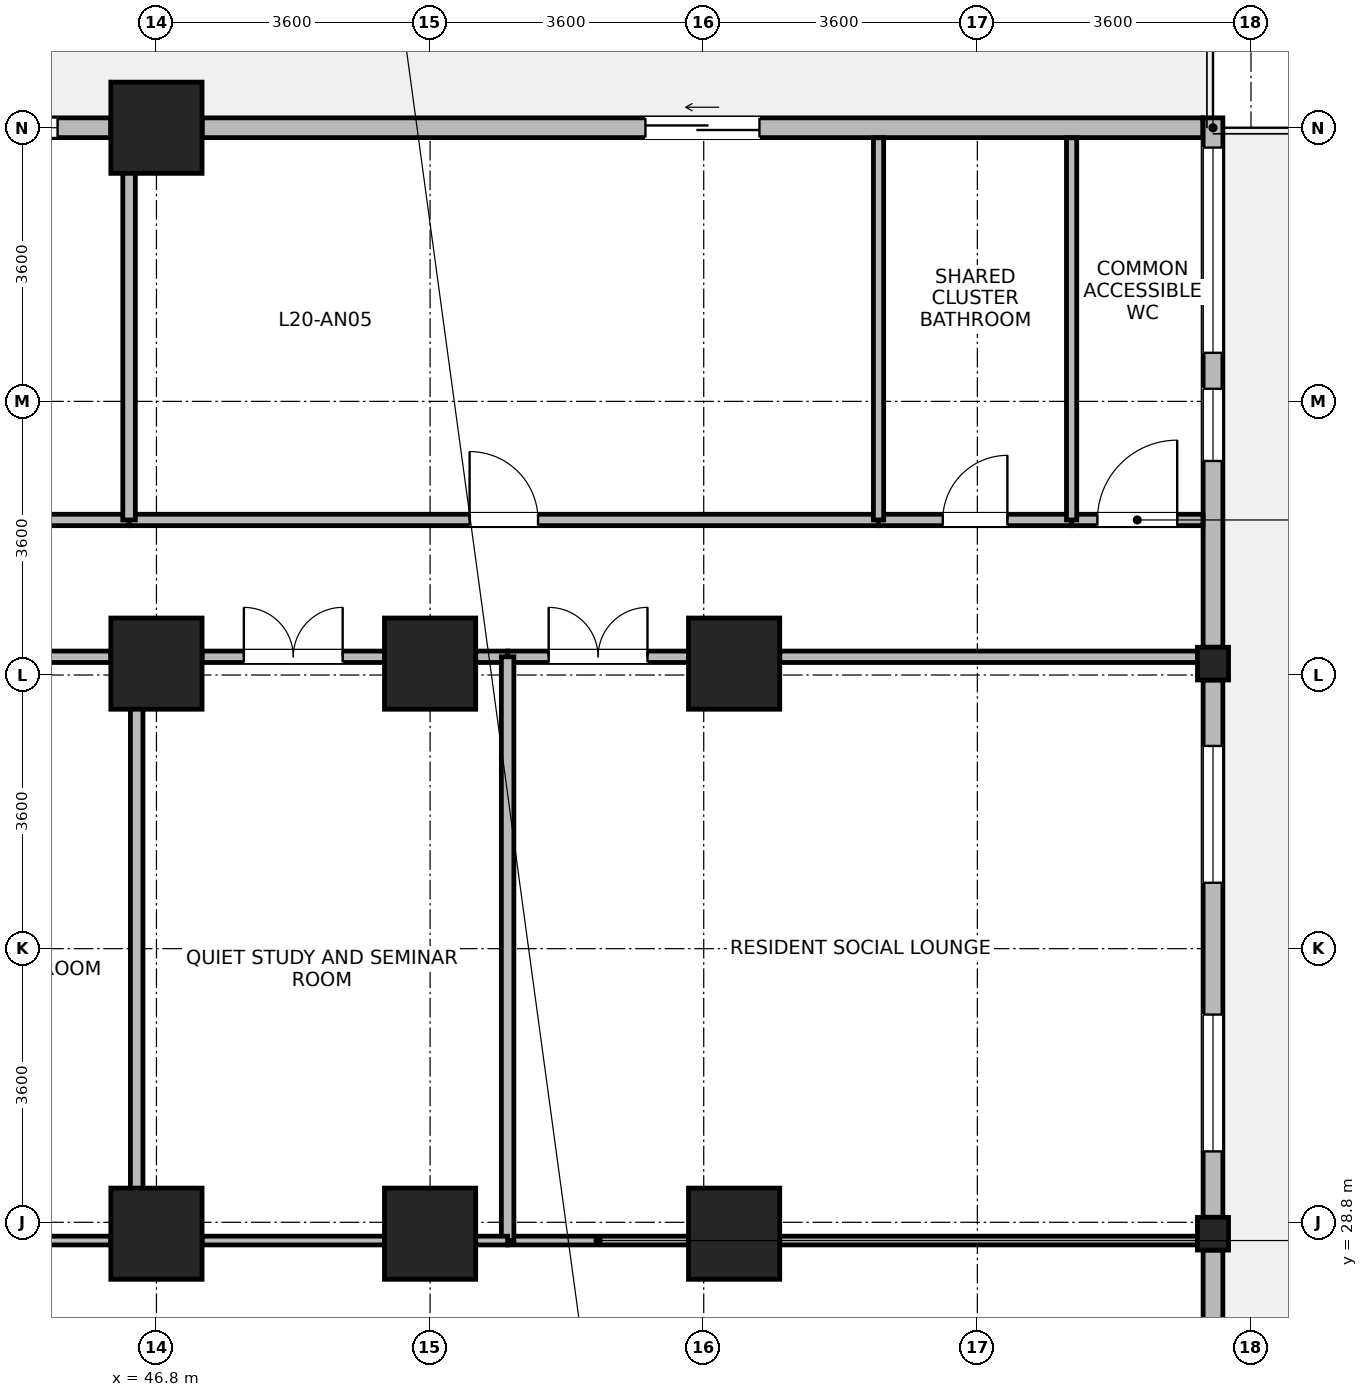
"""IFC4 building model, lengths in metres.
Left out: names, types, materials, properties, quantities, classifications, styles, units other than length and angle.
Written with IfcOpenShell. Run it as: python <this file> out.ifc"""

import sys

from ifc_helpers import new_model, si_unit, direction, frame, frame_2d, origin, origin_2d, place, context, subcontext, project, spatial, rectangle, i_section, extrude, source, transform, mapped, element, fill, save


model = new_model("IFC4")
c1 = context("Model", 3, precision=1e-05, world=origin(), true_north=direction((0.0, 1.0)))
c2 = subcontext(c1, "Body", "Model", "MODEL_VIEW")
j1 = project(units=[si_unit("LENGTHUNIT", "METRE"), si_unit("PLANEANGLEUNIT", "RADIAN")], contexts=[c1])
p1 = place(None, origin())
s1 = spatial("IfcSite", under=j1, at=p1, CompositionType="ELEMENT")
p2 = place(p1, origin())
s2 = spatial("IfcBuilding", under=s1, at=p2, CompositionType="ELEMENT")
p3 = place(p2, frame((0.0, 0.0, 82.3)))
s3 = spatial("IfcBuildingStorey", under=s2, at=p3, CompositionType="ELEMENT", Elevation=82.3)
m1 = source(origin(), c2, "Body", "SweptSolid", [
    extrude(rectangle(XDim=1.2, YDim=1.2, at=origin_2d()), origin(), (0.0, 0.0, 1.0), 3.7),
])
for number, where, z_axis, x_axis in (
    (1, (46.8, 28.65, 0.0), (0.0, 0.0, 1.0), (1.0, 0.0, 0.0)),
    (2, (46.8, 36.15, 0.0), (0.0, 0.0, 1.0), (1.0, 0.0, 0.0)),
    (3, (46.8, 43.2, 0.0), (0.0, 0.0, 1.0), (1.0, 0.0, 0.0)),
    (4, (50.4, 28.65, 0.0), (0.0, 0.0, 1.0), (1.0, 0.0, 0.0)),
    (5, (50.4, 36.15, 0.0), (0.0, 0.0, 1.0), (1.0, 0.0, 0.0)),
    (6, (54.4, 28.65, 0.0), (0.0, 0.0, 1.0), (1.0, 0.0, 0.0)),
    (7, (54.4, 36.15, 0.0), (0.0, 0.0, 1.0), (1.0, 0.0, 0.0)),
):
    element("IfcColumn", number, at=place(p3, frame(where, z_axis=z_axis, x_axis=x_axis)), inside=s3, PredefinedType="COLUMN", context=c2, shape_type="MappedRepresentation", body=[
        mapped(m1, transform((0.0, 0.0, 0.0), x_axis=(1.0, 0.0, 0.0), y_axis=(0.0, 1.0, 0.0), z_axis=(0.0, 0.0, 1.0), scale=1.0)),
    ])
m2 = source(origin(), c2, "Body", "SweptSolid", [
    extrude(i_section(OverallWidth=0.409, OverallDepth=0.43, WebThickness=0.024, FlangeThickness=0.033, FilletRadius=0.015, at=origin_2d()), origin(), (0.0, 0.0, 1.0), 3.7),
])
for number, where, z_axis, x_axis in (
    (8, (60.7, 28.65, 0.0), (0.0, 0.0, 1.0), (1.0, 0.0, 0.0)),
    (9, (60.7, 36.15, 0.0), (0.0, 0.0, 1.0), (1.0, 0.0, 0.0)),
):
    element("IfcColumn", number, at=place(p3, frame(where, z_axis=z_axis, x_axis=x_axis)), inside=s3, PredefinedType="COLUMN", context=c2, shape_type="MappedRepresentation", body=[
        mapped(m2, transform((0.0, 0.0, 0.0), x_axis=(1.0, 0.0, 0.0), y_axis=(0.0, 1.0, 0.0), z_axis=(0.0, 0.0, 1.0), scale=1.0)),
    ])
p4 = place(p3, frame((60.7, 28.434, 0.0), z_axis=(0.0, 0.0, 1.0), x_axis=(0.0, -1.0, 0.0)))
e10 = element("IfcWall", 10, at=p4, inside=s3, PredefinedType="STANDARD", context=c2, shape_type="SweptSolid", body=[
    extrude(rectangle(XDim=6.618, YDim=0.26, at=frame_2d((3.309, 0.0))), origin(), (0.0, 0.0, 1.0), 2.93),
])
p5 = place(p4, frame((4.063, 0.0, 0.85)))
e11 = element("IfcOpeningElement", 11, at=p5, cuts=e10, PredefinedType="OPENING", context=c2, shape_type="SweptSolid", body=[
    extrude(rectangle(XDim=1.8, YDim=1.85, at=frame_2d((0.9, 0.925))), frame((0.0, 0.14, 0.0), z_axis=(0.0, -1.0, 0.0), x_axis=(1.0, 0.0, 0.0)), (0.0, 0.0, 1.0), 0.28),
])
p6 = place(p4, frame((2.305, 0.0, 0.85)))
e12 = element("IfcOpeningElement", 12, at=p6, cuts=e10, PredefinedType="OPENING", context=c2, shape_type="SweptSolid", body=[
    extrude(rectangle(XDim=0.95, YDim=1.75, at=frame_2d((0.475, 0.875))), frame((0.0, 0.14, 0.0), z_axis=(0.0, -1.0, 0.0), x_axis=(1.0, 0.0, 0.0)), (0.0, 0.0, 1.0), 0.28),
])
p7 = place(p3, frame((60.7, 35.934, 0.0), z_axis=(0.0, 0.0, 1.0), x_axis=(0.0, -1.0, 0.0)))
e13 = element("IfcWall", 13, at=p7, inside=s3, PredefinedType="STANDARD", context=c2, shape_type="SweptSolid", body=[
    extrude(rectangle(XDim=7.068, YDim=0.26, at=frame_2d((3.534, 0.0))), origin(), (0.0, 0.0, 1.0), 2.93),
])
p8 = place(p7, frame((0.867, 0.0, 0.85)))
e14 = element("IfcOpeningElement", 14, at=p8, cuts=e13, PredefinedType="OPENING", context=c2, shape_type="SweptSolid", body=[
    extrude(rectangle(XDim=1.8, YDim=1.85, at=frame_2d((0.9, 0.925))), frame((0.0, 0.14, 0.0), z_axis=(0.0, -1.0, 0.0), x_axis=(1.0, 0.0, 0.0)), (0.0, 0.0, 1.0), 0.28),
])
p9 = place(p7, frame((4.401, 0.0, 0.85)))
e15 = element("IfcOpeningElement", 15, at=p9, cuts=e13, PredefinedType="OPENING", context=c2, shape_type="SweptSolid", body=[
    extrude(rectangle(XDim=1.8, YDim=1.85, at=frame_2d((0.9, 0.925))), frame((0.0, 0.14, 0.0), z_axis=(0.0, -1.0, 0.0), x_axis=(1.0, 0.0, 0.0)), (0.0, 0.0, 1.0), 0.28),
])
p10 = place(p3, frame((60.7, 43.33, 0.0), z_axis=(0.0, 0.0, 1.0), x_axis=(0.0, -1.0, 0.0)))
e16 = element("IfcWall", 16, at=p10, inside=s3, PredefinedType="STANDARD", context=c2, shape_type="SweptSolid", body=[
    extrude(rectangle(XDim=6.964, YDim=0.26, at=frame_2d((3.482, 0.0))), origin(), (0.0, 0.0, 1.0), 3.43),
])
p11 = place(p10, frame((0.391, 0.0, 0.85)))
e17 = element("IfcOpeningElement", 17, at=p11, cuts=e16, PredefinedType="OPENING", context=c2, shape_type="SweptSolid", body=[
    extrude(rectangle(XDim=2.7, YDim=2.05, at=frame_2d((1.35, 1.025))), frame((0.0, 0.14, 0.0), z_axis=(0.0, -1.0, 0.0), x_axis=(1.0, 0.0, 0.0)), (0.0, 0.0, 1.0), 0.28),
])
p12 = place(p10, frame((3.564, 0.0, 0.85)))
e18 = element("IfcOpeningElement", 18, at=p12, cuts=e16, PredefinedType="OPENING", context=c2, shape_type="SweptSolid", body=[
    extrude(rectangle(XDim=0.95, YDim=1.75, at=frame_2d((0.475, 0.875))), frame((0.0, 0.14, 0.0), z_axis=(0.0, -1.0, 0.0), x_axis=(1.0, 0.0, 0.0)), (0.0, 0.0, 1.0), 0.28),
])
p13 = place(p3, frame((47.401, 43.2, 0.0), z_axis=(0.0, 0.0, 1.0), x_axis=(1.0, 0.0, 0.0)))
e19 = element("IfcWall", 19, at=p13, inside=s3, PredefinedType="STANDARD", context=c2, shape_type="SweptSolid", body=[
    extrude(rectangle(XDim=13.164, YDim=0.26, at=frame_2d((6.582, 0.0))), origin(), (0.0, 0.0, 1.0), 3.43),
])
p14 = place(p13, frame((5.832, 0.0, 0.0)))
e20 = element("IfcOpeningElement", 20, at=p14, cuts=e19, PredefinedType="OPENING", context=c2, shape_type="SweptSolid", body=[
    extrude(rectangle(XDim=1.5, YDim=2.15, at=frame_2d((0.75, 1.075))), frame((0.0, 0.14, 0.0), z_axis=(0.0, -1.0, 0.0), x_axis=(1.0, 0.0, 0.0)), (0.0, 0.0, 1.0), 0.28),
])
p15 = place(p3, frame((36.601, 43.2, 0.0), z_axis=(0.0, 0.0, 1.0), x_axis=(1.0, 0.0, 0.0)))
e21 = element("IfcWall", 21, at=p15, inside=s3, PredefinedType="STANDARD", context=c2, shape_type="SweptSolid", body=[
    extrude(rectangle(XDim=9.598, YDim=0.26, at=frame_2d((4.799, 0.0))), origin(), (0.0, 0.0, 1.0), 2.93),
])
p16 = place(p15, frame((0.7, 0.0, 0.85)))
e22 = element("IfcOpeningElement", 22, at=p16, cuts=e21, PredefinedType="OPENING", context=c2, shape_type="SweptSolid", body=[
    extrude(rectangle(XDim=1.8, YDim=1.85, at=frame_2d((0.9, 0.925))), frame((0.0, 0.14, 0.0), z_axis=(0.0, -1.0, 0.0), x_axis=(1.0, 0.0, 0.0)), (0.0, 0.0, 1.0), 0.28),
])
p17 = place(p15, frame((3.899, 0.0, 0.85)))
e23 = element("IfcOpeningElement", 23, at=p17, cuts=e21, PredefinedType="OPENING", context=c2, shape_type="SweptSolid", body=[
    extrude(rectangle(XDim=1.8, YDim=1.85, at=frame_2d((0.9, 0.925))), frame((0.0, 0.14, 0.0), z_axis=(0.0, -1.0, 0.0), x_axis=(1.0, 0.0, 0.0)), (0.0, 0.0, 1.0), 0.28),
])
p18 = place(p15, frame((7.098, 0.0, 0.85)))
e24 = element("IfcOpeningElement", 24, at=p18, cuts=e21, PredefinedType="OPENING", context=c2, shape_type="SweptSolid", body=[
    extrude(rectangle(XDim=1.8, YDim=1.85, at=frame_2d((0.9, 0.925))), frame((0.0, 0.14, 0.0), z_axis=(0.0, -1.0, 0.0), x_axis=(1.0, 0.0, 0.0)), (0.0, 0.0, 1.0), 0.28),
])
p19 = place(p3, frame((35.72, 38.04, 0.0), z_axis=(0.0, 0.0, 1.0), x_axis=(1.0, 0.0, 0.0)))
e25 = element("IfcWall", 25, at=p19, inside=s3, PredefinedType="PARTITIONING", context=c2, shape_type="SweptSolid", body=[
    extrude(rectangle(XDim=10.72, YDim=0.15, at=frame_2d((5.36, 0.0))), origin(), (0.0, 0.0, 1.0), 3.43),
])
p20 = place(p19, frame((4.71, 0.0, 0.0)))
e26 = element("IfcOpeningElement", 26, at=p20, cuts=e25, PredefinedType="OPENING", context=c2, shape_type="SweptSolid", body=[
    extrude(rectangle(XDim=1.3, YDim=2.12, at=frame_2d((0.65, 1.06))), frame((0.0, 0.085, 0.0), z_axis=(0.0, -1.0, 0.0), x_axis=(1.0, 0.0, 0.0)), (0.0, 0.0, 1.0), 0.17),
])
p21 = place(p3, frame((46.44, 38.04, 0.0), z_axis=(0.0, 0.0, 1.0), x_axis=(1.0, 0.0, 0.0)))
e27 = element("IfcWall", 27, at=p21, inside=s3, PredefinedType="PARTITIONING", context=c2, shape_type="SweptSolid", body=[
    extrude(rectangle(XDim=9.86, YDim=0.15, at=frame_2d((4.93, 0.0))), origin(), (0.0, 0.0, 1.0), 3.43),
])
p22 = place(p21, frame((4.48, 0.0, 0.0)))
e28 = element("IfcOpeningElement", 28, at=p22, cuts=e27, PredefinedType="OPENING", context=c2, shape_type="SweptSolid", body=[
    extrude(rectangle(XDim=0.9, YDim=2.08, at=frame_2d((0.45, 1.04))), frame((0.0, 0.085, 0.0), z_axis=(0.0, -1.0, 0.0), x_axis=(1.0, 0.0, 0.0)), (0.0, 0.0, 1.0), 0.17),
])
p23 = place(p3, frame((51.42, 36.24, 0.0), z_axis=(0.0, 0.0, 1.0), x_axis=(1.0, 0.0, 0.0)))
e29 = element("IfcWall", 29, at=p23, inside=s3, PredefinedType="PARTITIONING", context=c2, shape_type="SweptSolid", body=[
    extrude(rectangle(XDim=2.38, YDim=0.15, at=frame_2d((1.19, 0.0))), origin(), (0.0, 0.0, 1.0), 2.78),
])
p24 = place(p23, frame((0.54, 0.0, 0.0)))
e30 = element("IfcOpeningElement", 30, at=p24, cuts=e29, PredefinedType="OPENING", context=c2, shape_type="SweptSolid", body=[
    extrude(rectangle(XDim=1.3, YDim=2.12, at=frame_2d((0.65, 1.06))), frame((0.0, 0.085, 0.0), z_axis=(0.0, -1.0, 0.0), x_axis=(1.0, 0.0, 0.0)), (0.0, 0.0, 1.0), 0.17),
])
p25 = place(p3, frame((55.0, 36.24, 0.0), z_axis=(0.0, 0.0, 1.0), x_axis=(1.0, 0.0, 0.0)))
e31 = element("IfcWall", 31, at=p25, inside=s3, PredefinedType="PARTITIONING", context=c2, shape_type="SweptSolid", body=[
    extrude(rectangle(XDim=5.496, YDim=0.15, at=frame_2d((2.748, 0.0))), origin(), (0.0, 0.0, 1.0), 2.78),
])
p26 = place(p3, frame((41.16, 36.24, 0.0), z_axis=(0.0, 0.0, 1.0), x_axis=(1.0, 0.0, 0.0)))
e32 = element("IfcWall", 32, at=p26, inside=s3, PredefinedType="PARTITIONING", context=c2, shape_type="SweptSolid", body=[
    extrude(rectangle(XDim=5.04, YDim=0.15, at=frame_2d((2.52, 0.0))), origin(), (0.0, 0.0, 1.0), 2.78),
])
p27 = place(p26, frame((1.87, 0.0, 0.0)))
e33 = element("IfcOpeningElement", 33, at=p27, cuts=e32, PredefinedType="OPENING", context=c2, shape_type="SweptSolid", body=[
    extrude(rectangle(XDim=1.3, YDim=2.12, at=frame_2d((0.65, 1.06))), frame((0.0, 0.085, 0.0), z_axis=(0.0, -1.0, 0.0), x_axis=(1.0, 0.0, 0.0)), (0.0, 0.0, 1.0), 0.17),
])
p28 = place(p3, frame((47.4, 36.24, 0.0), z_axis=(0.0, 0.0, 1.0), x_axis=(1.0, 0.0, 0.0)))
e34 = element("IfcWall", 34, at=p28, inside=s3, PredefinedType="PARTITIONING", context=c2, shape_type="SweptSolid", body=[
    extrude(rectangle(XDim=2.4, YDim=0.15, at=frame_2d((1.2, 0.0))), origin(), (0.0, 0.0, 1.0), 2.78),
])
p29 = place(p28, frame((0.55, 0.0, 0.0)))
e35 = element("IfcOpeningElement", 35, at=p29, cuts=e34, PredefinedType="OPENING", context=c2, shape_type="SweptSolid", body=[
    extrude(rectangle(XDim=1.3, YDim=2.12, at=frame_2d((0.65, 1.06))), frame((0.0, 0.085, 0.0), z_axis=(0.0, -1.0, 0.0), x_axis=(1.0, 0.0, 0.0)), (0.0, 0.0, 1.0), 0.17),
])
p30 = place(p3, frame((51.0, 36.24, 0.0), z_axis=(0.0, 0.0, 1.0), x_axis=(1.0, 0.0, 0.0)))
e36 = element("IfcWall", 36, at=p30, inside=s3, PredefinedType="PARTITIONING", context=c2, shape_type="SweptSolid", body=[
    extrude(rectangle(XDim=0.42, YDim=0.15, at=frame_2d((0.21, 0.0))), origin(), (0.0, 0.0, 1.0), 2.78),
])
p31 = place(p3, frame((56.3, 38.04, 0.0), z_axis=(0.0, 0.0, 1.0), x_axis=(1.0, 0.0, 0.0)))
e37 = element("IfcWall", 37, at=p31, inside=s3, PredefinedType="PARTITIONING", context=c2, shape_type="SweptSolid", body=[
    extrude(rectangle(XDim=2.54, YDim=0.15, at=frame_2d((1.27, 0.0))), origin(), (0.0, 0.0, 1.0), 3.43),
])
p32 = place(p31, frame((0.845, 0.0, 0.0)))
e38 = element("IfcOpeningElement", 38, at=p32, cuts=e37, PredefinedType="OPENING", context=c2, shape_type="SweptSolid", body=[
    extrude(rectangle(XDim=0.85, YDim=2.04, at=frame_2d((0.425, 1.02))), frame((0.0, 0.085, 0.0), z_axis=(0.0, -1.0, 0.0), x_axis=(1.0, 0.0, 0.0)), (0.0, 0.0, 1.0), 0.17),
])
p33 = place(p3, frame((58.84, 38.04, 0.0), z_axis=(0.0, 0.0, 1.0), x_axis=(1.0, 0.0, 0.0)))
e39 = element("IfcWall", 39, at=p33, inside=s3, PredefinedType="PARTITIONING", context=c2, shape_type="SweptSolid", body=[
    extrude(rectangle(XDim=1.728, YDim=0.15, at=frame_2d((0.864, 0.0))), origin(), (0.0, 0.0, 1.0), 3.43),
])
p34 = place(p33, frame((0.339, 0.0, 0.0)))
e40 = element("IfcOpeningElement", 40, at=p34, cuts=e39, PredefinedType="OPENING", context=c2, shape_type="SweptSolid", body=[
    extrude(rectangle(XDim=1.05, YDim=2.12, at=frame_2d((0.525, 1.06))), frame((0.0, 0.085, 0.0), z_axis=(0.0, -1.0, 0.0), x_axis=(1.0, 0.0, 0.0)), (0.0, 0.0, 1.0), 0.17),
])
p35 = place(p3, frame((51.42, 28.56, 0.0), z_axis=(0.0, 0.0, 1.0), x_axis=(1.0, 0.0, 0.0)))
e41 = element("IfcWall", 41, at=p35, inside=s3, PredefinedType="PARTITIONING", context=c2, shape_type="SweptSolid", body=[
    extrude(rectangle(XDim=2.38, YDim=0.115, at=frame_2d((1.19, 0.0))), origin(), (0.0, 0.0, 1.0), 2.78),
])
p36 = place(p3, frame((55.0, 28.56, 0.0), z_axis=(0.0, 0.0, 1.0), x_axis=(1.0, 0.0, 0.0)))
e42 = element("IfcWall", 42, at=p36, inside=s3, PredefinedType="PARTITIONING", context=c2, shape_type="SweptSolid", body=[
    extrude(rectangle(XDim=5.496, YDim=0.115, at=frame_2d((2.748, 0.0))), origin(), (0.0, 0.0, 1.0), 2.78),
])
for number, where, z_axis, x_axis in (
    (43, (46.54, 28.56, 0.0), (0.0, 0.0, 1.0), (0.0, 1.0, 0.0)),
    (44, (51.42, 28.56, 0.0), (0.0, 0.0, 1.0), (0.0, 1.0, 0.0)),
):
    element("IfcWall", number, at=place(p3, frame(where, z_axis=z_axis, x_axis=x_axis)), inside=s3, PredefinedType="PARTITIONING", context=c2, shape_type="SweptSolid", body=[
        extrude(rectangle(XDim=7.68, YDim=0.165, at=frame_2d((3.84, 0.0))), origin(), (0.0, 0.0, 1.0), 3.43),
    ])
p37 = place(p3, frame((41.16, 28.56, 0.0), z_axis=(0.0, 0.0, 1.0), x_axis=(1.0, 0.0, 0.0)))
e45 = element("IfcWall", 45, at=p37, inside=s3, PredefinedType="PARTITIONING", context=c2, shape_type="SweptSolid", body=[
    extrude(rectangle(XDim=5.04, YDim=0.115, at=frame_2d((2.52, 0.0))), origin(), (0.0, 0.0, 1.0), 2.78),
])
p38 = place(p3, frame((46.44, 38.04, 0.0), z_axis=(0.0, 0.0, 1.0), x_axis=(0.0, 1.0, 0.0)))
e46 = element("IfcWall", 46, at=p38, inside=s3, PredefinedType="PARTITIONING", context=c2, shape_type="SweptSolid", body=[
    extrude(rectangle(XDim=5.028, YDim=0.165, at=frame_2d((2.514, 0.0))), origin(), (0.0, 0.0, 1.0), 3.43),
])
for number, where, z_axis, x_axis in (
    (47, (56.3, 38.04, 0.0), (0.0, 0.0, 1.0), (0.0, 1.0, 0.0)),
    (48, (58.84, 38.04, 0.0), (0.0, 0.0, 1.0), (0.0, 1.0, 0.0)),
):
    element("IfcWall", number, at=place(p3, frame(where, z_axis=z_axis, x_axis=x_axis)), inside=s3, PredefinedType="PARTITIONING", context=c2, shape_type="SweptSolid", body=[
        extrude(rectangle(XDim=5.028, YDim=0.135, at=frame_2d((2.514, 0.0))), origin(), (0.0, 0.0, 1.0), 3.43),
    ])
p39 = place(p3, frame((47.4, 28.56, 0.0), z_axis=(0.0, 0.0, 1.0), x_axis=(1.0, 0.0, 0.0)))
e49 = element("IfcWall", 49, at=p39, inside=s3, PredefinedType="PARTITIONING", context=c2, shape_type="SweptSolid", body=[
    extrude(rectangle(XDim=2.4, YDim=0.115, at=frame_2d((1.2, 0.0))), origin(), (0.0, 0.0, 1.0), 2.78),
])
p40 = place(p3, frame((51.0, 28.56, 0.0), z_axis=(0.0, 0.0, 1.0), x_axis=(1.0, 0.0, 0.0)))
e50 = element("IfcWall", 50, at=p40, inside=s3, PredefinedType="PARTITIONING", context=c2, shape_type="SweptSolid", body=[
    extrude(rectangle(XDim=0.42, YDim=0.115, at=frame_2d((0.21, 0.0))), origin(), (0.0, 0.0, 1.0), 2.78),
])
p41 = place(p8, origin())
e51 = element("IfcWindow", 51, at=p41, inside=s3, PartitioningType="SINGLE_PANEL", PredefinedType="WINDOW", context=c2, shape_type="SweptSolid", body=[
    extrude(rectangle(XDim=1.8, YDim=1.85, at=frame_2d((0.9, 0.925))), frame((0.0, 0.03, 0.0), z_axis=(0.0, -1.0, 0.0), x_axis=(1.0, 0.0, 0.0)), (0.0, 0.0, 1.0), 0.06),
])
fill(e14, e51)
p42 = place(p9, origin())
e52 = element("IfcWindow", 52, at=p42, inside=s3, PartitioningType="SINGLE_PANEL", PredefinedType="WINDOW", context=c2, shape_type="SweptSolid", body=[
    extrude(rectangle(XDim=1.8, YDim=1.85, at=frame_2d((0.9, 0.925))), frame((0.0, 0.03, 0.0), z_axis=(0.0, -1.0, 0.0), x_axis=(1.0, 0.0, 0.0)), (0.0, 0.0, 1.0), 0.06),
])
fill(e15, e52)
p43 = place(p11, origin())
e53 = element("IfcWindow", 53, at=p43, inside=s3, PartitioningType="SINGLE_PANEL", PredefinedType="WINDOW", context=c2, shape_type="SweptSolid", body=[
    extrude(rectangle(XDim=2.7, YDim=2.05, at=frame_2d((1.35, 1.025))), frame((0.0, 0.03, 0.0), z_axis=(0.0, -1.0, 0.0), x_axis=(1.0, 0.0, 0.0)), (0.0, 0.0, 1.0), 0.06),
])
fill(e17, e53)
p44 = place(p12, origin())
e54 = element("IfcWindow", 54, at=p44, inside=s3, PartitioningType="SINGLE_PANEL", PredefinedType="WINDOW", context=c2, shape_type="SweptSolid", body=[
    extrude(rectangle(XDim=0.95, YDim=1.75, at=frame_2d((0.475, 0.875))), frame((0.0, 0.03, 0.0), z_axis=(0.0, -1.0, 0.0), x_axis=(1.0, 0.0, 0.0)), (0.0, 0.0, 1.0), 0.06),
])
fill(e18, e54)
p45 = place(p14, origin())
e55 = element("IfcDoor", 55, at=p45, inside=s3, OperationType="SLIDING_TO_LEFT", PredefinedType="DOOR", context=c2, shape_type="SweptSolid", body=[
    extrude(rectangle(XDim=1.5, YDim=2.15, at=frame_2d((0.75, 1.075))), frame((0.0, 0.025, 0.0), z_axis=(0.0, -1.0, 0.0), x_axis=(1.0, 0.0, 0.0)), (0.0, 0.0, 1.0), 0.05),
])
fill(e20, e55)
p46 = place(p18, origin())
e56 = element("IfcWindow", 56, at=p46, inside=s3, PartitioningType="SINGLE_PANEL", PredefinedType="WINDOW", context=c2, shape_type="SweptSolid", body=[
    extrude(rectangle(XDim=1.8, YDim=1.85, at=frame_2d((0.9, 0.925))), frame((0.0, 0.03, 0.0), z_axis=(0.0, -1.0, 0.0), x_axis=(1.0, 0.0, 0.0)), (0.0, 0.0, 1.0), 0.06),
])
fill(e24, e56)
p47 = place(p22, origin())
e57 = element("IfcDoor", 57, at=p47, inside=s3, OperationType="SINGLE_SWING_LEFT", PredefinedType="DOOR", context=c2, shape_type="SweptSolid", body=[
    extrude(rectangle(XDim=0.9, YDim=2.08, at=frame_2d((0.45, 1.04))), frame((0.0, 0.025, 0.0), z_axis=(0.0, -1.0, 0.0), x_axis=(1.0, 0.0, 0.0)), (0.0, 0.0, 1.0), 0.05),
])
fill(e28, e57)
p48 = place(p24, origin())
e58 = element("IfcDoor", 58, at=p48, inside=s3, OperationType="DOUBLE_DOOR_SINGLE_SWING", PredefinedType="DOOR", context=c2, shape_type="SweptSolid", body=[
    extrude(rectangle(XDim=1.3, YDim=2.12, at=frame_2d((0.65, 1.06))), frame((0.0, 0.025, 0.0), z_axis=(0.0, -1.0, 0.0), x_axis=(1.0, 0.0, 0.0)), (0.0, 0.0, 1.0), 0.05),
])
fill(e30, e58)
p49 = place(p29, origin())
e59 = element("IfcDoor", 59, at=p49, inside=s3, OperationType="DOUBLE_DOOR_SINGLE_SWING", PredefinedType="DOOR", context=c2, shape_type="SweptSolid", body=[
    extrude(rectangle(XDim=1.3, YDim=2.12, at=frame_2d((0.65, 1.06))), frame((0.0, 0.025, 0.0), z_axis=(0.0, -1.0, 0.0), x_axis=(1.0, 0.0, 0.0)), (0.0, 0.0, 1.0), 0.05),
])
fill(e35, e59)
p50 = place(p32, origin())
e60 = element("IfcDoor", 60, at=p50, inside=s3, OperationType="SINGLE_SWING_RIGHT", PredefinedType="DOOR", context=c2, shape_type="SweptSolid", body=[
    extrude(rectangle(XDim=0.85, YDim=2.04, at=frame_2d((0.425, 1.02))), frame((0.0, 0.025, 0.0), z_axis=(0.0, -1.0, 0.0), x_axis=(1.0, 0.0, 0.0)), (0.0, 0.0, 1.0), 0.05),
])
fill(e38, e60)
p51 = place(p34, origin())
e61 = element("IfcDoor", 61, at=p51, inside=s3, OperationType="SINGLE_SWING_RIGHT", PredefinedType="DOOR", context=c2, shape_type="SweptSolid", body=[
    extrude(rectangle(XDim=1.05, YDim=2.12, at=frame_2d((0.525, 1.06))), frame((0.0, 0.025, 0.0), z_axis=(0.0, -1.0, 0.0), x_axis=(1.0, 0.0, 0.0)), (0.0, 0.0, 1.0), 0.05),
])
fill(e40, e61)
save(model, sys.argv[1])
